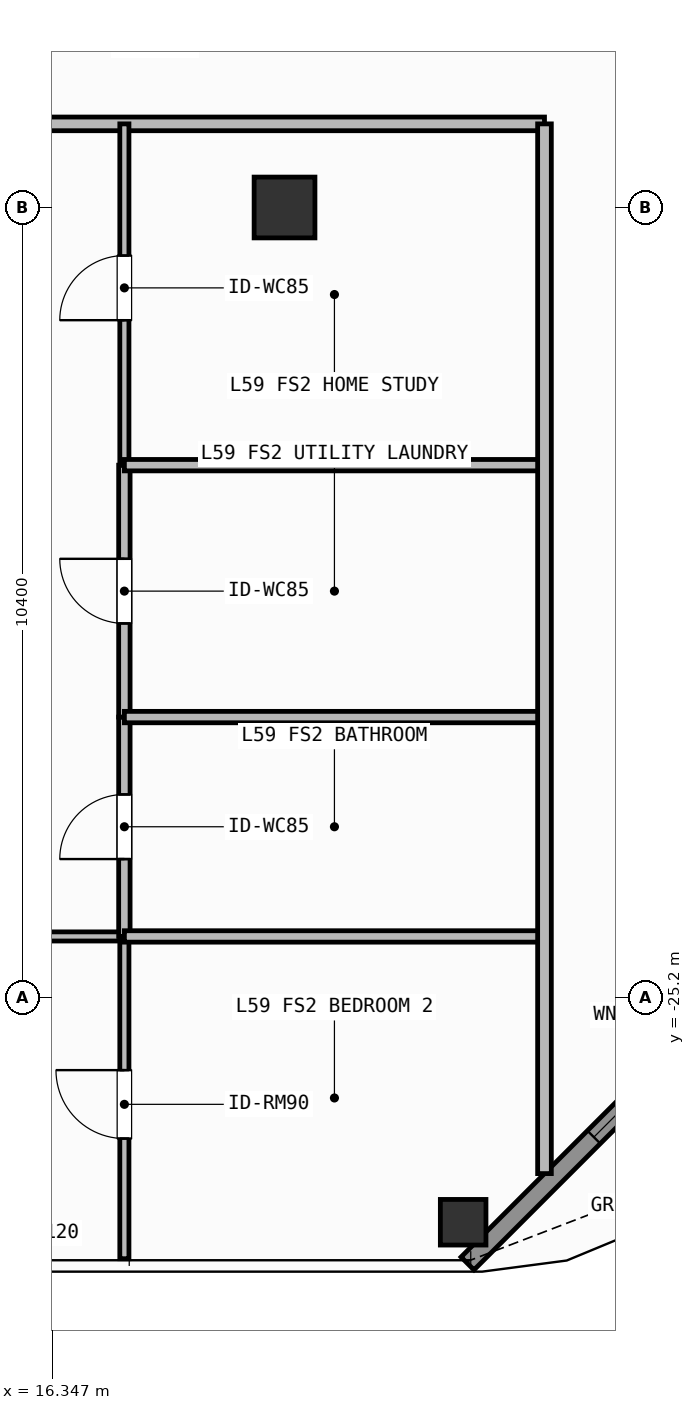
"""IFC4 building model, lengths in metres.
Left out: names, types, materials, properties, quantities, classifications, styles, units other than length and angle.
Written with IfcOpenShell. Run it as: python <this file> out.ifc"""

import sys

from ifc_helpers import new_model, si_unit, direction, frame, frame_2d, origin, origin_2d, place, context, subcontext, project, spatial, rectangle, hollow_rectangle, extrude, element, fill, save


model = new_model("IFC4")
c1 = context("Model", 3, precision=1e-05, world=origin(), true_north=direction((0.0, 1.0)))
c2 = subcontext(c1, "Body", "Model", "MODEL_VIEW")
j1 = project(units=[si_unit("LENGTHUNIT", "METRE"), si_unit("PLANEANGLEUNIT", "RADIAN")], contexts=[c1])
p1 = place(None, origin())
s1 = spatial("IfcSite", under=j1, at=p1, CompositionType="ELEMENT")
p2 = place(p1, origin())
s2 = spatial("IfcBuilding", under=s1, at=p2, CompositionType="ELEMENT")
p3 = place(p2, frame((0.0, 0.0, 243.0)))
s3 = spatial("IfcBuildingStorey", under=s2, at=p3, CompositionType="ELEMENT", Elevation=243.0)
p4 = place(p3, frame((19.4, -14.8, 0.0), z_axis=(0.0, 0.0, 1.0), x_axis=(1.0, 0.0, 0.0)))
e1 = element("IfcColumn", 1, at=p4, inside=s3, PredefinedType="COLUMN", context=c2, shape_type="SweptSolid", body=[
    extrude(hollow_rectangle(XDim=0.8, YDim=0.8, WallThickness=0.036, at=origin_2d()), origin(), (0.0, 0.0, 1.0), 3.9),
])
p5 = place(p3, frame((21.75, -28.15, 0.0), z_axis=(0.0, 0.0, 1.0), x_axis=(1.0, 0.0, 0.0)))
e2 = element("IfcColumn", 2, at=p5, inside=s3, PredefinedType="COLUMN", context=c2, shape_type="SweptSolid", body=[
    extrude(hollow_rectangle(XDim=0.6, YDim=0.6, WallThickness=0.028, at=origin_2d()), origin(), (0.0, 0.0, 1.0), 3.9),
])
p6 = place(p3, frame((26.192, -24.308, 0.0), z_axis=(0.0, 0.0, 1.0), x_axis=(-0.707106781187, -0.707106781187, 0.0)))
e3 = element("IfcWall", 3, at=p6, inside=s3, PredefinedType="SOLIDWALL", context=c2, shape_type="SweptSolid", body=[
    extrude(rectangle(XDim=6.201, YDim=0.24, at=frame_2d((3.101, 0.0))), origin(), (0.0, 0.0, 1.0), 3.68),
])
p7 = place(p6, frame((2.351, 0.0, 0.8)))
e4 = element("IfcOpeningElement", 4, at=p7, cuts=e3, PredefinedType="OPENING", context=c2, shape_type="SweptSolid", body=[
    extrude(rectangle(XDim=1.5, YDim=1.85, at=frame_2d((0.75, 0.925))), frame((0.0, 0.13, 0.0), z_axis=(0.0, -1.0, 0.0), x_axis=(1.0, 0.0, 0.0)), (0.0, 0.0, 1.0), 0.26),
])
p8 = place(p3, frame((6.927, -13.7, 0.0), z_axis=(0.0, 0.0, 1.0), x_axis=(1.0, 0.0, 0.0)))
e5 = element("IfcWall", 5, at=p8, inside=s3, PredefinedType="PARTITIONING", context=c2, shape_type="SweptSolid", body=[
    extrude(rectangle(XDim=15.893, YDim=0.18, at=frame_2d((7.947, 0.0))), origin(), (0.0, 0.0, 1.0), 3.68),
])
p9 = place(p8, frame((6.277, 0.0, 0.0)))
e6 = element("IfcOpeningElement", 6, at=p9, cuts=e5, PredefinedType="OPENING", context=c2, shape_type="SweptSolid", body=[
    extrude(rectangle(XDim=1.0, YDim=2.2, at=frame_2d((0.5, 1.1))), frame((0.0, 0.1, 0.0), z_axis=(0.0, -1.0, 0.0), x_axis=(1.0, 0.0, 0.0)), (0.0, 0.0, 1.0), 0.2),
])
p10 = place(p3, frame((11.73, -24.39, 0.0), z_axis=(0.0, 0.0, 1.0), x_axis=(1.0, 0.0, 0.0)))
e7 = element("IfcWall", 7, at=p10, inside=s3, PredefinedType="PARTITIONING", context=c2, shape_type="SweptSolid", body=[
    extrude(rectangle(XDim=5.563, YDim=0.12, at=frame_2d((2.781, 0.0))), origin(), (0.0, 0.0, 1.0), 3.68),
])
p11 = place(p10, frame((2.245, 0.0, 0.0)))
e8 = element("IfcOpeningElement", 8, at=p11, cuts=e7, PredefinedType="OPENING", context=c2, shape_type="SweptSolid", body=[
    extrude(rectangle(XDim=0.9, YDim=2.1, at=frame_2d((0.45, 1.05))), frame((0.0, 0.07, 0.0), z_axis=(0.0, -1.0, 0.0), x_axis=(1.0, 0.0, 0.0)), (0.0, 0.0, 1.0), 0.14),
])
p12 = place(p3, frame((17.293, -24.39, 0.0), z_axis=(0.0, 0.0, 1.0), x_axis=(0.0, 1.0, 0.0)))
e9 = element("IfcWall", 9, at=p12, inside=s3, PredefinedType="PARTITIONING", context=c2, shape_type="SweptSolid", body=[
    extrude(rectangle(XDim=2.886, YDim=0.15, at=frame_2d((1.443, 0.0))), origin(), (0.0, 0.0, 1.0), 3.68),
])
p13 = place(p12, frame((1.018, 0.0, 0.0)))
e10 = element("IfcOpeningElement", 10, at=p13, cuts=e9, PredefinedType="OPENING", context=c2, shape_type="SweptSolid", body=[
    extrude(rectangle(XDim=0.85, YDim=2.1, at=frame_2d((0.425, 1.05))), frame((0.0, 0.085, 0.0), z_axis=(0.0, -1.0, 0.0), x_axis=(1.0, 0.0, 0.0)), (0.0, 0.0, 1.0), 0.17),
])
p14 = place(p3, frame((17.293, -21.504, 0.0), z_axis=(0.0, 0.0, 1.0), x_axis=(0.0, 1.0, 0.0)))
e11 = element("IfcWall", 11, at=p14, inside=s3, PredefinedType="PARTITIONING", context=c2, shape_type="SweptSolid", body=[
    extrude(rectangle(XDim=3.314, YDim=0.15, at=frame_2d((1.657, 0.0))), origin(), (0.0, 0.0, 1.0), 3.68),
])
p15 = place(p14, frame((1.232, 0.0, 0.0)))
e12 = element("IfcOpeningElement", 12, at=p15, cuts=e11, PredefinedType="OPENING", context=c2, shape_type="SweptSolid", body=[
    extrude(rectangle(XDim=0.85, YDim=2.1, at=frame_2d((0.425, 1.05))), frame((0.0, 0.085, 0.0), z_axis=(0.0, -1.0, 0.0), x_axis=(1.0, 0.0, 0.0)), (0.0, 0.0, 1.0), 0.17),
])
p16 = place(p3, frame((17.293, -18.19, 0.0), z_axis=(0.0, 0.0, 1.0), x_axis=(0.0, 1.0, 0.0)))
e13 = element("IfcWall", 13, at=p16, inside=s3, PredefinedType="PARTITIONING", context=c2, shape_type="SweptSolid", body=[
    extrude(rectangle(XDim=4.49, YDim=0.12, at=frame_2d((2.245, 0.0))), origin(), (0.0, 0.0, 1.0), 3.68),
])
p17 = place(p16, frame((1.907, 0.0, 0.0)))
e14 = element("IfcOpeningElement", 14, at=p17, cuts=e13, PredefinedType="OPENING", context=c2, shape_type="SweptSolid", body=[
    extrude(rectangle(XDim=0.85, YDim=2.1, at=frame_2d((0.425, 1.05))), frame((0.0, 0.07, 0.0), z_axis=(0.0, -1.0, 0.0), x_axis=(1.0, 0.0, 0.0)), (0.0, 0.0, 1.0), 0.14),
])
p18 = place(p3, frame((17.293, -28.63, 0.0), z_axis=(0.0, 0.0, 1.0), x_axis=(0.0, 1.0, 0.0)))
e15 = element("IfcWall", 15, at=p18, inside=s3, PredefinedType="PARTITIONING", context=c2, shape_type="SweptSolid", body=[
    extrude(rectangle(XDim=4.24, YDim=0.12, at=frame_2d((2.12, 0.0))), origin(), (0.0, 0.0, 1.0), 3.68),
])
p19 = place(p18, frame((1.581, 0.0, 0.0)))
e16 = element("IfcOpeningElement", 16, at=p19, cuts=e15, PredefinedType="OPENING", context=c2, shape_type="SweptSolid", body=[
    extrude(rectangle(XDim=0.9, YDim=2.1, at=frame_2d((0.45, 1.05))), frame((0.0, 0.07, 0.0), z_axis=(0.0, -1.0, 0.0), x_axis=(1.0, 0.0, 0.0)), (0.0, 0.0, 1.0), 0.14),
])
p20 = place(p3, frame((17.293, -21.504, 0.0), z_axis=(0.0, 0.0, 1.0), x_axis=(1.0, 0.0, 0.0)))
e17 = element("IfcWall", 17, at=p20, inside=s3, PredefinedType="PARTITIONING", context=c2, shape_type="SweptSolid", body=[
    extrude(rectangle(XDim=5.527, YDim=0.15, at=frame_2d((2.764, 0.0))), origin(), (0.0, 0.0, 1.0), 3.42),
])
for number, where, z_axis, x_axis in (
    (18, (17.293, -18.19, 0.0), (0.0, 0.0, 1.0), (1.0, 0.0, 0.0)),
    (19, (17.293, -24.39, 0.0), (0.0, 0.0, 1.0), (1.0, 0.0, 0.0)),
):
    element("IfcWall", number, at=place(p3, frame(where, z_axis=z_axis, x_axis=x_axis)), inside=s3, PredefinedType="PARTITIONING", context=c2, shape_type="SweptSolid", body=[
        extrude(rectangle(XDim=5.527, YDim=0.15, at=frame_2d((2.764, 0.0))), origin(), (0.0, 0.0, 1.0), 3.68),
    ])
p21 = place(p3, frame((22.82, -27.51, 0.0), z_axis=(0.0, 0.0, 1.0), x_axis=(0.0, 1.0, 0.0)))
e20 = element("IfcWall", 20, at=p21, inside=s3, PredefinedType="PARTITIONING", context=c2, shape_type="SweptSolid", body=[
    extrude(rectangle(XDim=13.81, YDim=0.18, at=frame_2d((6.905, 0.0))), origin(), (0.0, 0.0, 1.0), 3.68),
])
p22 = place(p7, origin())
e21 = element("IfcWindow", 21, at=p22, inside=s3, PartitioningType="SINGLE_PANEL", PredefinedType="WINDOW", context=c2, shape_type="SweptSolid", body=[
    extrude(rectangle(XDim=1.5, YDim=1.85, at=frame_2d((0.75, 0.925))), frame((0.0, 0.03, 0.0), z_axis=(0.0, -1.0, 0.0), x_axis=(1.0, 0.0, 0.0)), (0.0, 0.0, 1.0), 0.06),
])
fill(e4, e21)
p23 = place(p13, origin())
e22 = element("IfcDoor", 22, at=p23, inside=s3, OperationType="SINGLE_SWING_LEFT", PredefinedType="DOOR", context=c2, shape_type="SweptSolid", body=[
    extrude(rectangle(XDim=0.85, YDim=2.1, at=frame_2d((0.425, 1.05))), frame((0.0, 0.025, 0.0), z_axis=(0.0, -1.0, 0.0), x_axis=(1.0, 0.0, 0.0)), (0.0, 0.0, 1.0), 0.05),
])
fill(e10, e22)
p24 = place(p15, origin())
e23 = element("IfcDoor", 23, at=p24, inside=s3, OperationType="SINGLE_SWING_RIGHT", PredefinedType="DOOR", context=c2, shape_type="SweptSolid", body=[
    extrude(rectangle(XDim=0.85, YDim=2.1, at=frame_2d((0.425, 1.05))), frame((0.0, 0.025, 0.0), z_axis=(0.0, -1.0, 0.0), x_axis=(1.0, 0.0, 0.0)), (0.0, 0.0, 1.0), 0.05),
])
fill(e12, e23)
p25 = place(p17, origin())
e24 = element("IfcDoor", 24, at=p25, inside=s3, OperationType="SINGLE_SWING_LEFT", PredefinedType="DOOR", context=c2, shape_type="SweptSolid", body=[
    extrude(rectangle(XDim=0.85, YDim=2.1, at=frame_2d((0.425, 1.05))), frame((0.0, 0.025, 0.0), z_axis=(0.0, -1.0, 0.0), x_axis=(1.0, 0.0, 0.0)), (0.0, 0.0, 1.0), 0.05),
])
fill(e14, e24)
p26 = place(p19, origin())
e25 = element("IfcDoor", 25, at=p26, inside=s3, OperationType="SINGLE_SWING_RIGHT", PredefinedType="DOOR", context=c2, shape_type="SweptSolid", body=[
    extrude(rectangle(XDim=0.9, YDim=2.1, at=frame_2d((0.45, 1.05))), frame((0.0, 0.025, 0.0), z_axis=(0.0, -1.0, 0.0), x_axis=(1.0, 0.0, 0.0)), (0.0, 0.0, 1.0), 0.05),
])
fill(e16, e25)
save(model, sys.argv[1])
